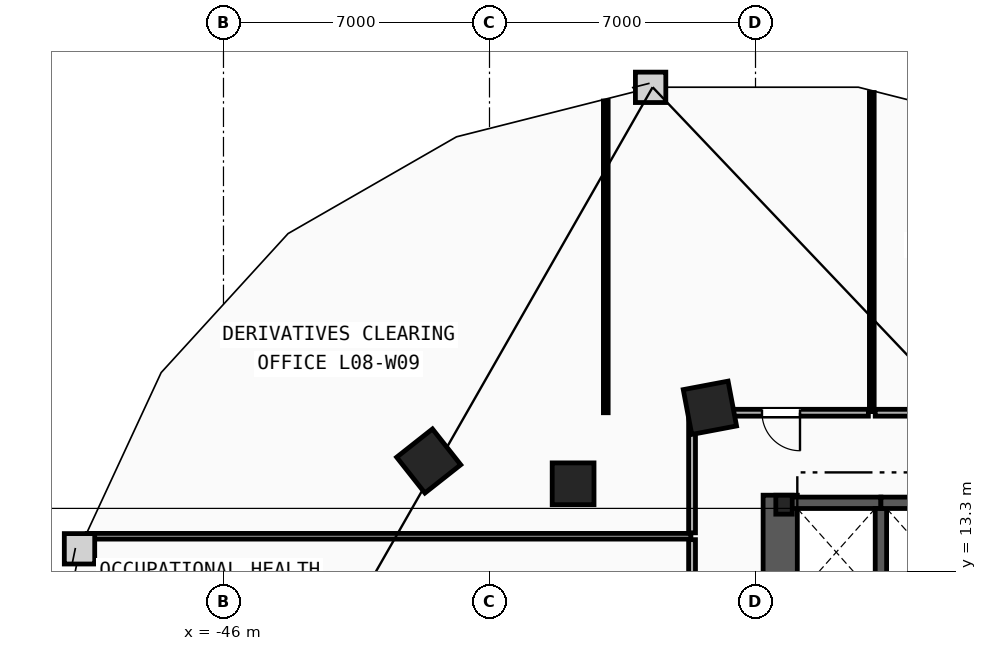
"""IFC4 building model, lengths in metres.
Left out: names, types, materials, properties, quantities, classifications, styles, units other than length and angle.
Written with IfcOpenShell. Run it as: python <this file> out.ifc"""

import sys

from ifc_helpers import new_model, si_unit, direction, frame, frame_2d, origin, origin_2d, place, context, subcontext, project, spatial, rectangle, i_section, extrude, element, fill, save


model = new_model("IFC4")
c1 = context("Model", 3, precision=1e-05, world=origin(), true_north=direction((0.0, 1.0)))
c2 = subcontext(c1, "Body", "Model", "MODEL_VIEW")
j1 = project(units=[si_unit("LENGTHUNIT", "METRE"), si_unit("PLANEANGLEUNIT", "RADIAN")], contexts=[c1])
p1 = place(None, origin())
s1 = spatial("IfcSite", under=j1, at=p1, CompositionType="ELEMENT")
p2 = place(p1, origin())
s2 = spatial("IfcBuilding", under=s1, at=p2, CompositionType="ELEMENT")
p3 = place(p2, frame((0.0, 0.0, 35.4)))
s3 = spatial("IfcBuildingStorey", under=s2, at=p3, CompositionType="ELEMENT", Elevation=35.4)
p4 = place(p3, frame((-31.25, 15.05, 0.0), z_axis=(0.0, 0.0, 1.0), x_axis=(1.0, 0.0, 0.0)))
e1 = element("IfcColumn", 1, at=p4, inside=s3, PredefinedType="COLUMN", context=c2, shape_type="SweptSolid", body=[
    extrude(i_section(OverallWidth=0.432, OverallDepth=0.498, WebThickness=0.056, FlangeThickness=0.089, FilletRadius=0.018, at=origin_2d()), origin(), (0.0, 0.0, 1.0), 3.8),
])
p5 = place(p3, frame((-36.8, 15.6, 0.0), z_axis=(0.0, 0.0, 1.0), x_axis=(1.0, 0.0, 0.0)))
e2 = element("IfcColumn", 2, at=p5, inside=s3, PredefinedType="COLUMN", context=c2, shape_type="SweptSolid", body=[
    extrude(rectangle(XDim=1.1, YDim=1.1, at=origin_2d()), origin(), (0.0, 0.0, 1.0), 3.8),
])
for number, where, z_axis, x_axis in (
    (3, (-33.2, 17.6, 0.0), (0.0, 0.0, 1.0), (-0.983, -0.186, 0.0)),
    (4, (-40.6, 16.2, 0.0), (0.0, 0.0, 1.0), (-0.785, -0.619, 0.0)),
):
    element("IfcColumn", number, at=place(p3, frame(where, z_axis=z_axis, x_axis=x_axis)), inside=s3, PredefinedType="COLUMN", context=c2, shape_type="SweptSolid", body=[
        extrude(rectangle(XDim=1.2, YDim=1.2, at=origin_2d()), origin(), (0.0, 0.0, 1.0), 3.8),
    ])
p6 = place(p3, frame((-31.35, 1.97, 0.0), z_axis=(0.0, 0.0, 1.0), x_axis=(0.0, 1.0, 0.0)))
e5 = element("IfcWall", 5, at=p6, inside=s3, PredefinedType="SHEAR", context=c2, shape_type="SweptSolid", body=[
    extrude(rectangle(XDim=13.33, YDim=0.9, at=frame_2d((6.665, 0.0))), origin(), (0.0, 0.0, 1.0), 3.5),
])
p7 = place(p3, frame((-31.2, 15.1, 0.0), z_axis=(0.0, 0.0, 1.0), x_axis=(1.0, 0.0, 0.0)))
e6 = element("IfcWall", 6, at=p7, inside=s3, PredefinedType="SHEAR", context=c2, shape_type="SweptSolid", body=[
    extrude(rectangle(XDim=2.5, YDim=0.3, at=frame_2d((1.25, 0.0))), origin(), (0.0, 0.0, 1.0), 3.5),
])
p8 = place(p3, frame((-28.7, 12.65, 0.0), z_axis=(0.0, 0.0, 1.0), x_axis=(0.0, 1.0, 0.0)))
e7 = element("IfcWall", 7, at=p8, inside=s3, PredefinedType="SHEAR", context=c2, shape_type="SweptSolid", body=[
    extrude(rectangle(XDim=2.3, YDim=0.3, at=frame_2d((1.15, 0.0))), origin(), (0.0, 0.0, 1.0), 3.5),
])
p9 = place(p3, frame((-28.7, 15.1, 0.0), z_axis=(0.0, 0.0, 1.0), x_axis=(1.0, 0.0, 0.0)))
e8 = element("IfcWall", 8, at=p9, inside=s3, PredefinedType="SHEAR", context=c2, shape_type="SweptSolid", body=[
    extrude(rectangle(XDim=2.5, YDim=0.3, at=frame_2d((1.25, 0.0))), origin(), (0.0, 0.0, 1.0), 3.5),
])
p10 = place(p3, frame((-49.585, 14.22, 0.0), z_axis=(0.0, 0.0, 1.0), x_axis=(1.0, 0.0, 0.0)))
e9 = element("IfcWall", 9, at=p10, inside=s3, PredefinedType="PARTITIONING", context=c2, shape_type="SweptSolid", body=[
    extrude(rectangle(XDim=15.885, YDim=0.15, at=frame_2d((7.942, 0.0))), origin(), (0.0, 0.0, 1.0), 3.5),
])
p11 = place(p3, frame((-35.94, 17.47, 0.0), z_axis=(0.0, 0.0, 1.0), x_axis=(0.0, 1.0, 0.0)))
e10 = element("IfcWall", 10, at=p11, inside=s3, PredefinedType="PARTITIONING", context=c2, shape_type="SweptSolid", body=[
    extrude(rectangle(XDim=8.202, YDim=0.125, at=frame_2d((4.101, 0.0))), origin(), (0.0, 0.0, 1.0), 3.5),
])
p12 = place(p3, frame((-28.94, 17.5, 0.0), z_axis=(0.0, 0.0, 1.0), x_axis=(0.0, 1.0, 0.0)))
e11 = element("IfcWall", 11, at=p12, inside=s3, PredefinedType="PARTITIONING", context=c2, shape_type="SweptSolid", body=[
    extrude(rectangle(XDim=8.395, YDim=0.125, at=frame_2d((4.197, 0.0))), origin(), (0.0, 0.0, 1.0), 3.5),
])
p13 = place(p3, frame((-33.67, 14.13, 0.0), z_axis=(0.0, 0.0, 1.0), x_axis=(0.0, -1.0, 0.0)))
e12 = element("IfcWall", 12, at=p13, inside=s3, PredefinedType="PARTITIONING", context=c2, shape_type="SweptSolid", body=[
    extrude(rectangle(XDim=5.128, YDim=0.18, at=frame_2d((2.564, 0.0))), origin(), (0.0, 0.0, 1.0), 3.5),
])
p14 = place(p13, frame((2.064, 0.0, 0.0)))
e13 = element("IfcOpeningElement", 13, at=p14, cuts=e12, PredefinedType="OPENING", context=c2, shape_type="SweptSolid", body=[
    extrude(rectangle(XDim=1.0, YDim=2.15, at=frame_2d((0.5, 1.075))), frame((0.0, 0.1, 0.0), z_axis=(0.0, -1.0, 0.0), x_axis=(1.0, 0.0, 0.0)), (0.0, 0.0, 1.0), 0.2),
])
p15 = place(p3, frame((-29.03, 17.47, 0.0), z_axis=(0.0, 0.0, 1.0), x_axis=(-1.0, 0.0, 0.0)))
e14 = element("IfcWall", 14, at=p15, inside=s3, PredefinedType="PARTITIONING", context=c2, shape_type="SweptSolid", body=[
    extrude(rectangle(XDim=4.598, YDim=0.18, at=frame_2d((2.299, 0.0))), origin(), (0.0, 0.0, 1.0), 3.5),
])
p16 = place(p15, frame((1.799, 0.0, 0.0)))
e15 = element("IfcOpeningElement", 15, at=p16, cuts=e14, PredefinedType="OPENING", context=c2, shape_type="SweptSolid", body=[
    extrude(rectangle(XDim=1.0, YDim=2.15, at=frame_2d((0.5, 1.075))), frame((0.0, 0.1, 0.0), z_axis=(0.0, -1.0, 0.0), x_axis=(1.0, 0.0, 0.0)), (0.0, 0.0, 1.0), 0.2),
])
p17 = place(p3, frame((-33.67, 17.428, 0.0), z_axis=(0.0, 0.0, 1.0), x_axis=(0.0, -1.0, 0.0)))
e16 = element("IfcWall", 16, at=p17, inside=s3, PredefinedType="PARTITIONING", context=c2, shape_type="SweptSolid", body=[
    extrude(rectangle(XDim=3.118, YDim=0.18, at=frame_2d((1.559, 0.0))), origin(), (0.0, 0.0, 1.0), 3.5),
])
p18 = place(p3, frame((-23.03, 17.47, 0.0), z_axis=(0.0, 0.0, 1.0), x_axis=(-1.0, 0.0, 0.0)))
e17 = element("IfcWall", 17, at=p18, inside=s3, PredefinedType="PARTITIONING", context=c2, shape_type="SweptSolid", body=[
    extrude(rectangle(XDim=5.82, YDim=0.18, at=frame_2d((2.91, 0.0))), origin(), (0.0, 0.0, 1.0), 3.5),
])
p19 = place(p18, frame((1.036, 0.0, 0.0)))
e18 = element("IfcOpeningElement", 18, at=p19, cuts=e17, PredefinedType="OPENING", context=c2, shape_type="SweptSolid", body=[
    extrude(rectangle(XDim=1.0, YDim=2.15, at=frame_2d((0.5, 1.075))), frame((0.0, 0.1, 0.0), z_axis=(0.0, -1.0, 0.0), x_axis=(1.0, 0.0, 0.0)), (0.0, 0.0, 1.0), 0.2),
])
p20 = place(p16, origin())
e19 = element("IfcDoor", 19, at=p20, inside=s3, OperationType="SINGLE_SWING_LEFT", PredefinedType="DOOR", context=c2, shape_type="SweptSolid", body=[
    extrude(rectangle(XDim=1.0, YDim=2.15, at=frame_2d((0.5, 1.075))), frame((0.0, 0.025, 0.0), z_axis=(0.0, -1.0, 0.0), x_axis=(1.0, 0.0, 0.0)), (0.0, 0.0, 1.0), 0.05),
])
fill(e15, e19)
save(model, sys.argv[1])
